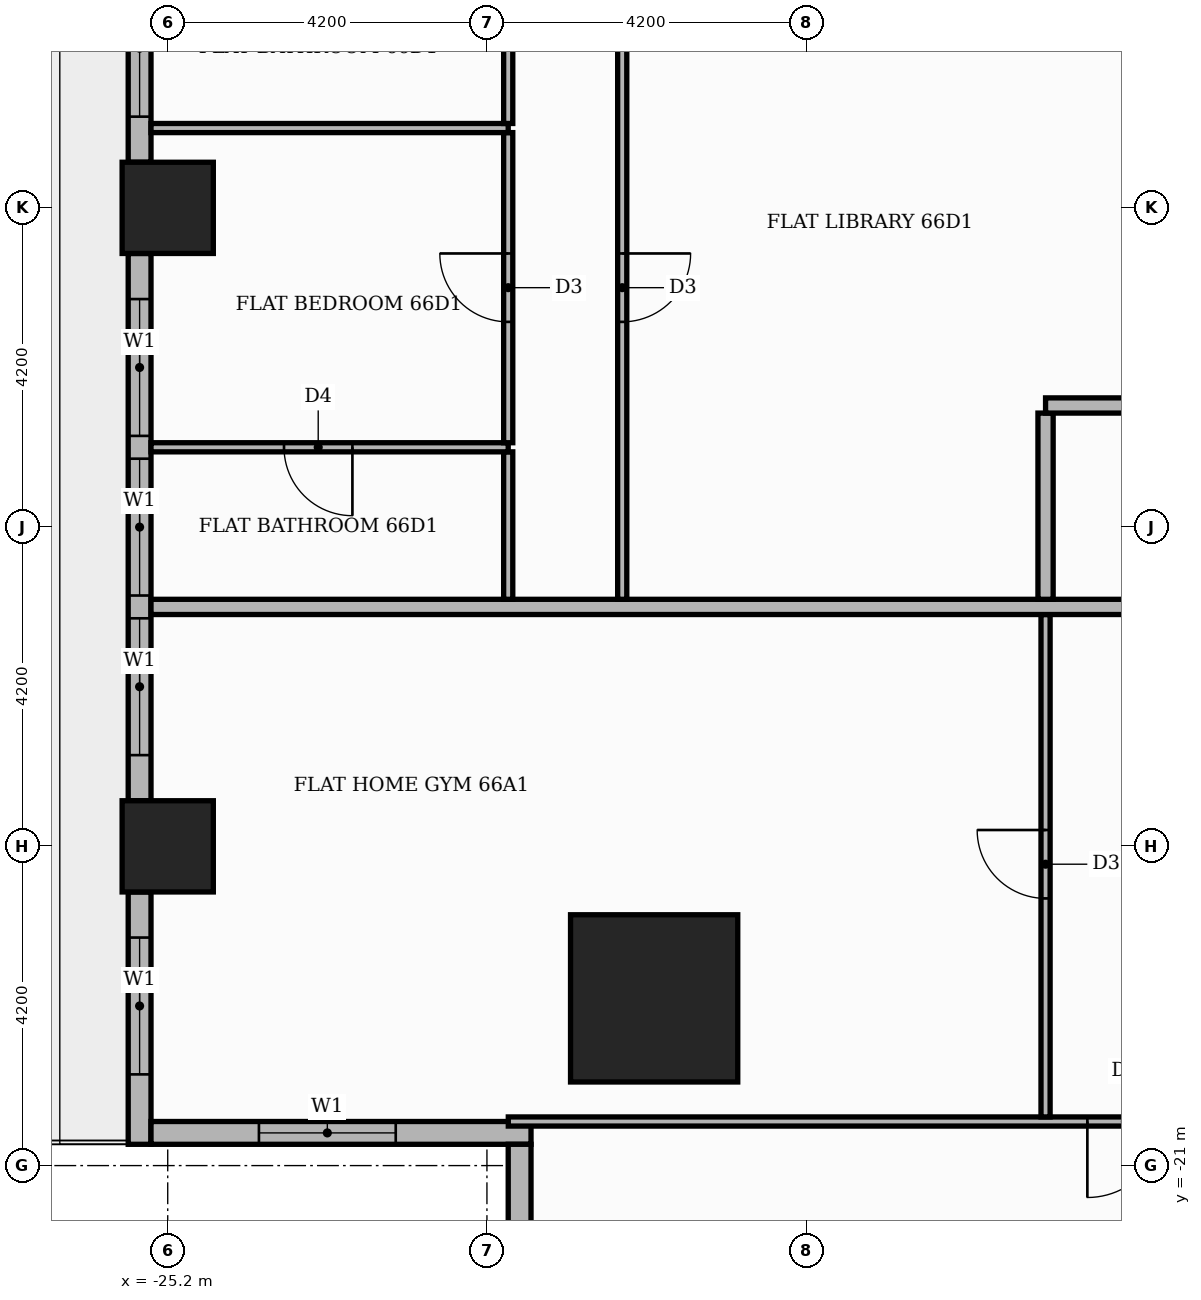
"""IFC4 building model, lengths in metres.
Left out: names, types, materials, properties, quantities, classifications, styles, units other than length and angle.
Written with IfcOpenShell. Run it as: python <this file> out.ifc"""

import sys

from ifc_helpers import new_model, si_unit, direction, frame, frame_2d, origin, origin_2d, place, context, subcontext, project, spatial, rectangle, extrude, element, fill, save


model = new_model("IFC4")
c1 = context("Model", 3, precision=1e-05, world=origin(), true_north=direction((0.0, 1.0)))
c2 = subcontext(c1, "Body", "Model", "MODEL_VIEW")
j1 = project(units=[si_unit("LENGTHUNIT", "METRE"), si_unit("PLANEANGLEUNIT", "RADIAN")], contexts=[c1])
p1 = place(None, origin())
s1 = spatial("IfcSite", under=j1, at=p1, CompositionType="ELEMENT")
p2 = place(p1, origin())
s2 = spatial("IfcBuilding", under=s1, at=p2, CompositionType="ELEMENT")
p3 = place(p2, frame((0.0, 0.0, 275.7)))
s3 = spatial("IfcBuildingStorey", under=s2, at=p3, CompositionType="ELEMENT", Elevation=275.7)
p4 = place(p3, frame((-18.8, -18.8, 0.0), z_axis=(0.0, 0.0, 1.0), x_axis=(1.0, 0.0, 0.0)))
e1 = element("IfcColumn", 1, at=p4, inside=s3, PredefinedType="COLUMN", context=c2, shape_type="SweptSolid", body=[
    extrude(rectangle(XDim=2.2, YDim=2.2, at=origin_2d()), origin(), (0.0, 0.0, 1.0), 3.9),
])
for number, where, z_axis, x_axis in (
    (2, (-25.2, -8.4, 0.0), (0.0, 0.0, 1.0), (1.0, 0.0, 0.0)),
    (3, (-25.2, -16.8, 0.0), (0.0, 0.0, 1.0), (1.0, 0.0, 0.0)),
):
    element("IfcColumn", number, at=place(p3, frame(where, z_axis=z_axis, x_axis=x_axis)), inside=s3, PredefinedType="COLUMN", context=c2, shape_type="SweptSolid", body=[
        extrude(rectangle(XDim=1.2, YDim=1.2, at=origin_2d()), origin(), (0.0, 0.0, 1.0), 3.9),
    ])
p5 = place(p3, frame((-25.57, -0.6, 0.0), z_axis=(0.0, 0.0, 1.0), x_axis=(0.0, -1.0, 0.0)))
e4 = element("IfcWall", 4, at=p5, inside=s3, PredefinedType="STANDARD", context=c2, shape_type="SweptSolid", body=[
    extrude(rectangle(XDim=7.2, YDim=0.3, at=frame_2d((3.6, 0.0))), origin(), (0.0, 0.0, 1.0), 3.48),
])
p6 = place(p5, frame((0.6, 0.0, 0.9)))
e5 = element("IfcOpeningElement", 5, at=p6, cuts=e4, PredefinedType="OPENING", context=c2, shape_type="SweptSolid", body=[
    extrude(rectangle(XDim=3.9, YDim=2.1, at=frame_2d((1.95, 1.05))), frame((0.0, 0.16, 0.0), z_axis=(0.0, -1.0, 0.0), x_axis=(1.0, 0.0, 0.0)), (0.0, 0.0, 1.0), 0.32),
])
p7 = place(p5, frame((4.8, 0.0, 0.9)))
e6 = element("IfcOpeningElement", 6, at=p7, cuts=e4, PredefinedType="OPENING", context=c2, shape_type="SweptSolid", body=[
    extrude(rectangle(XDim=1.8, YDim=2.1, at=frame_2d((0.9, 1.05))), frame((0.0, 0.16, 0.0), z_axis=(0.0, -1.0, 0.0), x_axis=(1.0, 0.0, 0.0)), (0.0, 0.0, 1.0), 0.32),
])
p8 = place(p3, frame((-25.57, -9.0, 0.0), z_axis=(0.0, 0.0, 1.0), x_axis=(0.0, -1.0, 0.0)))
e7 = element("IfcWall", 7, at=p8, inside=s3, PredefinedType="STANDARD", context=c2, shape_type="SweptSolid", body=[
    extrude(rectangle(XDim=7.2, YDim=0.3, at=frame_2d((3.6, 0.0))), origin(), (0.0, 0.0, 1.0), 3.48),
])
p9 = place(p8, frame((0.6, 0.0, 0.9)))
e8 = element("IfcOpeningElement", 8, at=p9, cuts=e7, PredefinedType="OPENING", context=c2, shape_type="SweptSolid", body=[
    extrude(rectangle(XDim=1.8, YDim=2.1, at=frame_2d((0.9, 1.05))), frame((0.0, 0.16, 0.0), z_axis=(0.0, -1.0, 0.0), x_axis=(1.0, 0.0, 0.0)), (0.0, 0.0, 1.0), 0.32),
])
p10 = place(p8, frame((2.7, 0.0, 0.9)))
e9 = element("IfcOpeningElement", 9, at=p10, cuts=e7, PredefinedType="OPENING", context=c2, shape_type="SweptSolid", body=[
    extrude(rectangle(XDim=1.8, YDim=2.1, at=frame_2d((0.9, 1.05))), frame((0.0, 0.16, 0.0), z_axis=(0.0, -1.0, 0.0), x_axis=(1.0, 0.0, 0.0)), (0.0, 0.0, 1.0), 0.32),
])
p11 = place(p8, frame((4.8, 0.0, 0.9)))
e10 = element("IfcOpeningElement", 10, at=p11, cuts=e7, PredefinedType="OPENING", context=c2, shape_type="SweptSolid", body=[
    extrude(rectangle(XDim=1.8, YDim=2.1, at=frame_2d((0.9, 1.05))), frame((0.0, 0.16, 0.0), z_axis=(0.0, -1.0, 0.0), x_axis=(1.0, 0.0, 0.0)), (0.0, 0.0, 1.0), 0.32),
])
p12 = place(p3, frame((-25.57, -17.4, 0.0), z_axis=(0.0, 0.0, 1.0), x_axis=(0.0, -1.0, 0.0)))
e11 = element("IfcWall", 11, at=p12, inside=s3, PredefinedType="STANDARD", context=c2, shape_type="SweptSolid", body=[
    extrude(rectangle(XDim=3.32, YDim=0.3, at=frame_2d((1.66, 0.0))), origin(), (0.0, 0.0, 1.0), 3.48),
])
p13 = place(p12, frame((0.6, 0.0, 0.9)))
e12 = element("IfcOpeningElement", 12, at=p13, cuts=e11, PredefinedType="OPENING", context=c2, shape_type="SweptSolid", body=[
    extrude(rectangle(XDim=1.8, YDim=2.1, at=frame_2d((0.9, 1.05))), frame((0.0, 0.16, 0.0), z_axis=(0.0, -1.0, 0.0), x_axis=(1.0, 0.0, 0.0)), (0.0, 0.0, 1.0), 0.32),
])
p14 = place(p3, frame((-25.42, -20.57, 0.0), z_axis=(0.0, 0.0, 1.0), x_axis=(1.0, 0.0, 0.0)))
e13 = element("IfcWall", 13, at=p14, inside=s3, PredefinedType="STANDARD", context=c2, shape_type="SweptSolid", body=[
    extrude(rectangle(XDim=5.0, YDim=0.3, at=frame_2d((2.5, 0.0))), origin(), (0.0, 0.0, 1.0), 3.48),
])
p15 = place(p14, frame((1.42, 0.0, 0.9)))
e14 = element("IfcOpeningElement", 14, at=p15, cuts=e13, PredefinedType="OPENING", context=c2, shape_type="SweptSolid", body=[
    extrude(rectangle(XDim=1.8, YDim=2.1, at=frame_2d((0.9, 1.05))), frame((0.0, 0.16, 0.0), z_axis=(0.0, -1.0, 0.0), x_axis=(1.0, 0.0, 0.0)), (0.0, 0.0, 1.0), 0.32),
])
p16 = place(p3, frame((-20.57, -20.72, 0.0), z_axis=(0.0, 0.0, 1.0), x_axis=(0.0, -1.0, 0.0)))
e15 = element("IfcWall", 15, at=p16, inside=s3, PredefinedType="STANDARD", context=c2, shape_type="SweptSolid", body=[
    extrude(rectangle(XDim=5.0, YDim=0.3, at=frame_2d((2.5, 0.0))), origin(), (0.0, 0.0, 1.0), 3.48),
])
p17 = place(p16, frame((1.48, 0.0, 0.9)))
e16 = element("IfcOpeningElement", 16, at=p17, cuts=e15, PredefinedType="OPENING", context=c2, shape_type="SweptSolid", body=[
    extrude(rectangle(XDim=1.8, YDim=2.1, at=frame_2d((0.9, 1.05))), frame((0.0, 0.16, 0.0), z_axis=(0.0, -1.0, 0.0), x_axis=(1.0, 0.0, 0.0)), (0.0, 0.0, 1.0), 0.32),
])
p18 = place(p3, frame((-20.719, -20.42, 0.0), z_axis=(0.0, 0.0, 1.0), x_axis=(1.0, 0.0, 0.0)))
e17 = element("IfcWall", 17, at=p18, inside=s3, PredefinedType="PARTITIONING", context=c2, shape_type="SweptSolid", body=[
    extrude(rectangle(XDim=9.169, YDim=0.12, at=frame_2d((4.584, 0.0))), origin(), (0.0, 0.0, 1.0), 3.48),
])
p19 = place(p18, frame((7.619, 0.0, 0.0)))
e18 = element("IfcOpeningElement", 18, at=p19, cuts=e17, PredefinedType="OPENING", context=c2, shape_type="SweptSolid", body=[
    extrude(rectangle(XDim=1.0, YDim=2.1, at=frame_2d((0.5, 1.05))), frame((0.0, 0.07, 0.0), z_axis=(0.0, -1.0, 0.0), x_axis=(1.0, 0.0, 0.0)), (0.0, 0.0, 1.0), 0.14),
])
p20 = place(p3, frame((-13.65, -20.36, 0.0), z_axis=(0.0, 0.0, 1.0), x_axis=(0.0, 1.0, 0.0)))
e19 = element("IfcWall", 19, at=p20, inside=s3, PredefinedType="PARTITIONING", context=c2, shape_type="SweptSolid", body=[
    extrude(rectangle(XDim=6.61, YDim=0.12, at=frame_2d((3.305, 0.0))), origin(), (0.0, 0.0, 1.0), 3.48),
])
p21 = place(p20, frame((2.875, 0.0, 0.0)))
e20 = element("IfcOpeningElement", 20, at=p21, cuts=e19, PredefinedType="OPENING", context=c2, shape_type="SweptSolid", body=[
    extrude(rectangle(XDim=0.9, YDim=2.1, at=frame_2d((0.45, 1.05))), frame((0.0, 0.07, 0.0), z_axis=(0.0, -1.0, 0.0), x_axis=(1.0, 0.0, 0.0)), (0.0, 0.0, 1.0), 0.14),
])
p22 = place(p3, frame((-25.42, -13.65, 0.0), z_axis=(0.0, 0.0, 1.0), x_axis=(1.0, 0.0, 0.0)))
e21 = element("IfcWall", 21, at=p22, inside=s3, PredefinedType="PARTITIONING", context=c2, shape_type="SweptSolid", body=[
    extrude(rectangle(XDim=39.07, YDim=0.2, at=frame_2d((19.535, 0.0))), origin(), (0.0, 0.0, 1.0), 3.48),
])
p23 = place(p22, frame((14.37, 0.0, 0.0)))
e22 = element("IfcOpeningElement", 22, at=p23, cuts=e21, PredefinedType="OPENING", context=c2, shape_type="SweptSolid", body=[
    extrude(rectangle(XDim=1.1, YDim=2.4, at=frame_2d((0.55, 1.2))), frame((0.0, 0.11, 0.0), z_axis=(0.0, -1.0, 0.0), x_axis=(1.0, 0.0, 0.0)), (0.0, 0.0, 1.0), 0.22),
])
p24 = place(p3, frame((-20.72, -13.55, 0.0), z_axis=(0.0, 0.0, 1.0), x_axis=(0.0, 1.0, 0.0)))
e23 = element("IfcWall", 23, at=p24, inside=s3, PredefinedType="PARTITIONING", context=c2, shape_type="SweptSolid", body=[
    extrude(rectangle(XDim=1.94, YDim=0.12, at=frame_2d((0.97, 0.0))), origin(), (0.0, 0.0, 1.0), 3.48),
])
p25 = place(p3, frame((-19.22, -13.55, 0.0), z_axis=(0.0, 0.0, 1.0), x_axis=(0.0, 1.0, 0.0)))
e24 = element("IfcWall", 24, at=p25, inside=s3, PredefinedType="PARTITIONING", context=c2, shape_type="SweptSolid", body=[
    extrude(rectangle(XDim=8.24, YDim=0.12, at=frame_2d((4.12, 0.0))), origin(), (0.0, 0.0, 1.0), 3.48),
])
p26 = place(p25, frame((3.65, 0.0, 0.0)))
e25 = element("IfcOpeningElement", 25, at=p26, cuts=e24, PredefinedType="OPENING", context=c2, shape_type="SweptSolid", body=[
    extrude(rectangle(XDim=0.9, YDim=2.1, at=frame_2d((0.45, 1.05))), frame((0.0, 0.07, 0.0), z_axis=(0.0, -1.0, 0.0), x_axis=(1.0, 0.0, 0.0)), (0.0, 0.0, 1.0), 0.14),
])
p27 = place(p3, frame((-13.65, -13.55, 0.0), z_axis=(0.0, 0.0, 1.0), x_axis=(0.0, 1.0, 0.0)))
e26 = element("IfcWall", 26, at=p27, inside=s3, PredefinedType="PARTITIONING", context=c2, shape_type="SweptSolid", body=[
    extrude(rectangle(XDim=2.45, YDim=0.2, at=frame_2d((1.225, 0.0))), origin(), (0.0, 0.0, 1.0), 3.48),
])
p28 = place(p3, frame((-25.42, -11.55, 0.0), z_axis=(0.0, 0.0, 1.0), x_axis=(1.0, 0.0, 0.0)))
e27 = element("IfcWall", 27, at=p28, inside=s3, PredefinedType="PARTITIONING", context=c2, shape_type="SweptSolid", body=[
    extrude(rectangle(XDim=4.7, YDim=0.12, at=frame_2d((2.35, 0.0))), origin(), (0.0, 0.0, 1.0), 3.48),
])
p29 = place(p28, frame((1.75, 0.0, 0.0)))
e28 = element("IfcOpeningElement", 28, at=p29, cuts=e27, PredefinedType="OPENING", context=c2, shape_type="SweptSolid", body=[
    extrude(rectangle(XDim=0.9, YDim=2.1, at=frame_2d((0.45, 1.05))), frame((0.0, 0.07, 0.0), z_axis=(0.0, -1.0, 0.0), x_axis=(1.0, 0.0, 0.0)), (0.0, 0.0, 1.0), 0.14),
])
p30 = place(p3, frame((-20.72, -11.49, 0.0), z_axis=(0.0, 0.0, 1.0), x_axis=(0.0, 1.0, 0.0)))
e29 = element("IfcWall", 29, at=p30, inside=s3, PredefinedType="PARTITIONING", context=c2, shape_type="SweptSolid", body=[
    extrude(rectangle(XDim=4.08, YDim=0.12, at=frame_2d((2.04, 0.0))), origin(), (0.0, 0.0, 1.0), 3.48),
])
p31 = place(p30, frame((1.59, 0.0, 0.0)))
e30 = element("IfcOpeningElement", 30, at=p31, cuts=e29, PredefinedType="OPENING", context=c2, shape_type="SweptSolid", body=[
    extrude(rectangle(XDim=0.9, YDim=2.1, at=frame_2d((0.45, 1.05))), frame((0.0, 0.07, 0.0), z_axis=(0.0, -1.0, 0.0), x_axis=(1.0, 0.0, 0.0)), (0.0, 0.0, 1.0), 0.14),
])
p32 = place(p3, frame((-13.65, -11.0, 0.0), z_axis=(0.0, 0.0, 1.0), x_axis=(1.0, 0.0, 0.0)))
e31 = element("IfcWall", 31, at=p32, inside=s3, PredefinedType="PARTITIONING", context=c2, shape_type="SweptSolid", body=[
    extrude(rectangle(XDim=2.65, YDim=0.2, at=frame_2d((1.325, 0.0))), origin(), (0.0, 0.0, 1.0), 3.48),
])
p33 = place(p3, frame((-25.42, -7.35, 0.0), z_axis=(0.0, 0.0, 1.0), x_axis=(1.0, 0.0, 0.0)))
e32 = element("IfcWall", 32, at=p33, inside=s3, PredefinedType="PARTITIONING", context=c2, shape_type="SweptSolid", body=[
    extrude(rectangle(XDim=4.7, YDim=0.12, at=frame_2d((2.35, 0.0))), origin(), (0.0, 0.0, 1.0), 3.48),
])
p34 = place(p3, frame((-20.72, -7.29, 0.0), z_axis=(0.0, 0.0, 1.0), x_axis=(0.0, 1.0, 0.0)))
e33 = element("IfcWall", 33, at=p34, inside=s3, PredefinedType="PARTITIONING", context=c2, shape_type="SweptSolid", body=[
    extrude(rectangle(XDim=1.98, YDim=0.12, at=frame_2d((0.99, 0.0))), origin(), (0.0, 0.0, 1.0), 3.48),
])
p35 = place(p7, origin())
e34 = element("IfcWindow", 34, at=p35, inside=s3, PartitioningType="SINGLE_PANEL", PredefinedType="WINDOW", context=c2, shape_type="SweptSolid", body=[
    extrude(rectangle(XDim=1.8, YDim=2.1, at=frame_2d((0.9, 1.05))), frame((0.0, 0.03, 0.0), z_axis=(0.0, -1.0, 0.0), x_axis=(1.0, 0.0, 0.0)), (0.0, 0.0, 1.0), 0.06),
])
fill(e6, e34)
p36 = place(p9, origin())
e35 = element("IfcWindow", 35, at=p36, inside=s3, PartitioningType="SINGLE_PANEL", PredefinedType="WINDOW", context=c2, shape_type="SweptSolid", body=[
    extrude(rectangle(XDim=1.8, YDim=2.1, at=frame_2d((0.9, 1.05))), frame((0.0, 0.03, 0.0), z_axis=(0.0, -1.0, 0.0), x_axis=(1.0, 0.0, 0.0)), (0.0, 0.0, 1.0), 0.06),
])
fill(e8, e35)
p37 = place(p10, origin())
e36 = element("IfcWindow", 36, at=p37, inside=s3, PartitioningType="SINGLE_PANEL", PredefinedType="WINDOW", context=c2, shape_type="SweptSolid", body=[
    extrude(rectangle(XDim=1.8, YDim=2.1, at=frame_2d((0.9, 1.05))), frame((0.0, 0.03, 0.0), z_axis=(0.0, -1.0, 0.0), x_axis=(1.0, 0.0, 0.0)), (0.0, 0.0, 1.0), 0.06),
])
fill(e9, e36)
p38 = place(p11, origin())
e37 = element("IfcWindow", 37, at=p38, inside=s3, PartitioningType="SINGLE_PANEL", PredefinedType="WINDOW", context=c2, shape_type="SweptSolid", body=[
    extrude(rectangle(XDim=1.8, YDim=2.1, at=frame_2d((0.9, 1.05))), frame((0.0, 0.03, 0.0), z_axis=(0.0, -1.0, 0.0), x_axis=(1.0, 0.0, 0.0)), (0.0, 0.0, 1.0), 0.06),
])
fill(e10, e37)
p39 = place(p13, origin())
e38 = element("IfcWindow", 38, at=p39, inside=s3, PartitioningType="SINGLE_PANEL", PredefinedType="WINDOW", context=c2, shape_type="SweptSolid", body=[
    extrude(rectangle(XDim=1.8, YDim=2.1, at=frame_2d((0.9, 1.05))), frame((0.0, 0.03, 0.0), z_axis=(0.0, -1.0, 0.0), x_axis=(1.0, 0.0, 0.0)), (0.0, 0.0, 1.0), 0.06),
])
fill(e12, e38)
p40 = place(p15, origin())
e39 = element("IfcWindow", 39, at=p40, inside=s3, PartitioningType="SINGLE_PANEL", PredefinedType="WINDOW", context=c2, shape_type="SweptSolid", body=[
    extrude(rectangle(XDim=1.8, YDim=2.1, at=frame_2d((0.9, 1.05))), frame((0.0, 0.03, 0.0), z_axis=(0.0, -1.0, 0.0), x_axis=(1.0, 0.0, 0.0)), (0.0, 0.0, 1.0), 0.06),
])
fill(e14, e39)
p41 = place(p21, origin())
e40 = element("IfcDoor", 40, at=p41, inside=s3, OperationType="SINGLE_SWING_RIGHT", PredefinedType="DOOR", context=c2, shape_type="SweptSolid", body=[
    extrude(rectangle(XDim=0.9, YDim=2.1, at=frame_2d((0.45, 1.05))), frame((0.0, 0.025, 0.0), z_axis=(0.0, -1.0, 0.0), x_axis=(1.0, 0.0, 0.0)), (0.0, 0.0, 1.0), 0.05),
])
fill(e20, e40)
p42 = place(p19, frame((1.0, 0.0, 0.0), z_axis=(0.0, 0.0, 1.0), x_axis=(-1.0, 0.0, 0.0)))
e41 = element("IfcDoor", 41, at=p42, inside=s3, OperationType="SINGLE_SWING_LEFT", PredefinedType="DOOR", context=c2, shape_type="SweptSolid", body=[
    extrude(rectangle(XDim=1.0, YDim=2.1, at=frame_2d((0.5, 1.05))), frame((0.0, 0.025, 0.0), z_axis=(0.0, -1.0, 0.0), x_axis=(1.0, 0.0, 0.0)), (0.0, 0.0, 1.0), 0.05),
])
fill(e18, e41)
p43 = place(p26, frame((0.9, 0.0, 0.0), z_axis=(0.0, 0.0, 1.0), x_axis=(-1.0, 0.0, 0.0)))
e42 = element("IfcDoor", 42, at=p43, inside=s3, OperationType="SINGLE_SWING_RIGHT", PredefinedType="DOOR", context=c2, shape_type="SweptSolid", body=[
    extrude(rectangle(XDim=0.9, YDim=2.1, at=frame_2d((0.45, 1.05))), frame((0.0, 0.025, 0.0), z_axis=(0.0, -1.0, 0.0), x_axis=(1.0, 0.0, 0.0)), (0.0, 0.0, 1.0), 0.05),
])
fill(e25, e42)
p44 = place(p31, origin())
e43 = element("IfcDoor", 43, at=p44, inside=s3, OperationType="SINGLE_SWING_RIGHT", PredefinedType="DOOR", context=c2, shape_type="SweptSolid", body=[
    extrude(rectangle(XDim=0.9, YDim=2.1, at=frame_2d((0.45, 1.05))), frame((0.0, 0.025, 0.0), z_axis=(0.0, -1.0, 0.0), x_axis=(1.0, 0.0, 0.0)), (0.0, 0.0, 1.0), 0.05),
])
fill(e30, e43)
p45 = place(p29, frame((0.9, 0.0, 0.0), z_axis=(0.0, 0.0, 1.0), x_axis=(-1.0, 0.0, 0.0)))
e44 = element("IfcDoor", 44, at=p45, inside=s3, OperationType="SINGLE_SWING_RIGHT", PredefinedType="DOOR", context=c2, shape_type="SweptSolid", body=[
    extrude(rectangle(XDim=0.9, YDim=2.1, at=frame_2d((0.45, 1.05))), frame((0.0, 0.025, 0.0), z_axis=(0.0, -1.0, 0.0), x_axis=(1.0, 0.0, 0.0)), (0.0, 0.0, 1.0), 0.05),
])
fill(e28, e44)
save(model, sys.argv[1])
